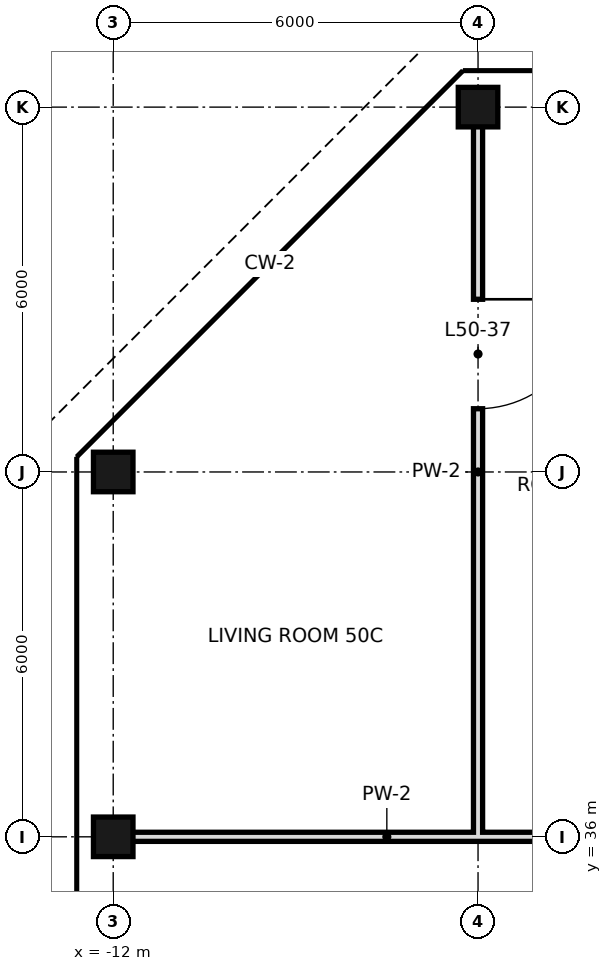
"""IFC4 building model, lengths in metres.
Left out: names, types, materials, properties, quantities, classifications, styles, units other than length and angle.
Written with IfcOpenShell. Run it as: python <this file> out.ifc"""

import sys

from ifc_helpers import new_model, si_unit, direction, frame, frame_2d, origin, origin_2d, place, context, subcontext, project, spatial, rectangle, hollow_rectangle, extrude, element, fill, save


model = new_model("IFC4")
c1 = context("Model", 3, precision=1e-05, world=origin(), true_north=direction((0.0, 1.0)))
c2 = subcontext(c1, "Body", "Model", "MODEL_VIEW")
j1 = project(units=[si_unit("LENGTHUNIT", "METRE"), si_unit("PLANEANGLEUNIT", "RADIAN")], contexts=[c1])
p1 = place(None, origin())
s1 = spatial("IfcSite", under=j1, at=p1, CompositionType="ELEMENT")
p2 = place(p1, origin())
s2 = spatial("IfcBuilding", under=s1, at=p2, CompositionType="ELEMENT")
p3 = place(p2, frame((0.0, 0.0, 215.4)))
s3 = spatial("IfcBuildingStorey", under=s2, at=p3, CompositionType="ELEMENT", Elevation=215.4)
for number, where, z_axis, x_axis in (
    (1, (-12.0, 36.0, 0.0), (0.0, 0.0, 1.0), (1.0, 0.0, 0.0)),
    (2, (-12.0, 42.0, 0.0), (0.0, 0.0, 1.0), (1.0, 0.0, 0.0)),
    (3, (-6.0, 48.0, 0.0), (0.0, 0.0, 1.0), (1.0, 0.0, 0.0)),
):
    element("IfcColumn", number, at=place(p3, frame(where, z_axis=z_axis, x_axis=x_axis)), inside=s3, PredefinedType="COLUMN", context=c2, shape_type="SweptSolid", body=[
        extrude(hollow_rectangle(XDim=0.65, YDim=0.65, WallThickness=0.032, at=origin_2d()), origin(), (0.0, 0.0, 1.0), 3.6),
    ])
p4 = place(p3, frame((-6.0, 36.0, 0.0), z_axis=(0.0, 0.0, 1.0), x_axis=(0.0, 1.0, 0.0)))
e4 = element("IfcWall", 4, at=p4, inside=s3, PredefinedType="PARTITIONING", context=c2, shape_type="SweptSolid", body=[
    extrude(rectangle(XDim=12.0, YDim=0.15, at=frame_2d((6.0, 0.0))), origin(), (0.0, 0.0, 1.0), 3.42),
])
p5 = place(p4, frame((7.04, 0.0, 0.0)))
e5 = element("IfcOpeningElement", 5, at=p5, cuts=e4, PredefinedType="OPENING", context=c2, shape_type="SweptSolid", body=[
    extrude(rectangle(XDim=1.8, YDim=2.4, at=frame_2d((0.9, 1.2))), frame((0.0, 0.085, 0.0), z_axis=(0.0, -1.0, 0.0), x_axis=(1.0, 0.0, 0.0)), (0.0, 0.0, 1.0), 0.17),
])
p6 = place(p3, frame((-12.0, 36.0, 0.0), z_axis=(0.0, 0.0, 1.0), x_axis=(1.0, 0.0, 0.0)))
e6 = element("IfcWall", 6, at=p6, inside=s3, PredefinedType="PARTITIONING", context=c2, shape_type="SweptSolid", body=[
    extrude(rectangle(XDim=9.0, YDim=0.15, at=frame_2d((4.5, 0.0))), origin(), (0.0, 0.0, 1.0), 2.72),
])
p7 = place(p5, origin())
e7 = element("IfcDoor", 7, at=p7, inside=s3, OperationType="SINGLE_SWING_RIGHT", PredefinedType="DOOR", context=c2, shape_type="SweptSolid", body=[
    extrude(rectangle(XDim=1.8, YDim=2.4, at=frame_2d((0.9, 1.2))), frame((0.0, 0.025, 0.0), z_axis=(0.0, -1.0, 0.0), x_axis=(1.0, 0.0, 0.0)), (0.0, 0.0, 1.0), 0.05),
])
fill(e5, e7)
save(model, sys.argv[1])
